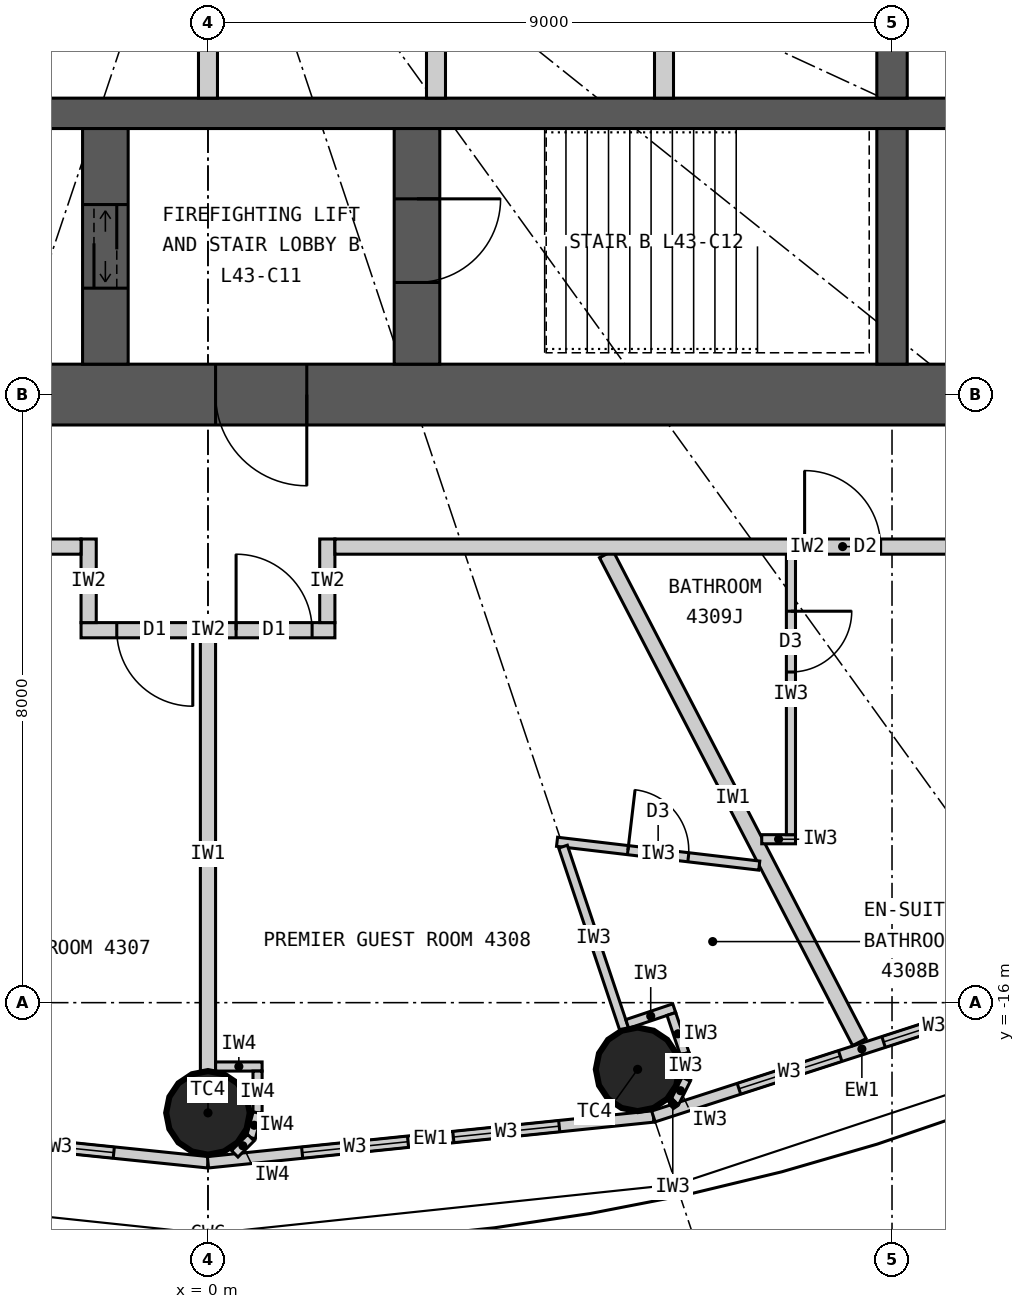
"""IFC4 building model, lengths in metres.
Left out: names, types, materials, properties, quantities, classifications, styles, units other than length and angle.
Written with IfcOpenShell. Run it as: python <this file> out.ifc"""

import sys

from ifc_helpers import new_model, si_unit, direction, frame, frame_2d, origin, origin_2d, place, context, subcontext, project, spatial, rectangle, circle, extrude, element, fill, save


model = new_model("IFC4")
c1 = context("Model", 3, precision=1e-05, world=origin(), true_north=direction((0.0, 1.0)))
c2 = subcontext(c1, "Body", "Model", "MODEL_VIEW")
j1 = project(units=[si_unit("LENGTHUNIT", "METRE"), si_unit("PLANEANGLEUNIT", "RADIAN")], contexts=[c1])
p1 = place(None, origin())
s1 = spatial("IfcSite", under=j1, at=p1, CompositionType="ELEMENT")
p2 = place(p1, origin())
s2 = spatial("IfcBuilding", under=s1, at=p2, CompositionType="ELEMENT")
p3 = place(p2, frame((0.0, 0.0, 163.2)))
s3 = spatial("IfcBuildingStorey", under=s2, at=p3, CompositionType="ELEMENT", Elevation=163.2)
for number, where, z_axis, x_axis in (
    (1, (0.0, -17.45, 0.0), (0.0, 0.0, 1.0), (1.0, 0.0, 0.0)),
    (2, (5.653, -16.877, 0.0), (0.0, 0.0, 1.0), (1.0, 0.0, 0.0)),
):
    element("IfcColumn", number, at=place(p3, frame(where, z_axis=z_axis, x_axis=x_axis)), inside=s3, PredefinedType="COLUMN", context=c2, shape_type="SweptSolid", body=[
        extrude(circle(Radius=0.55, at=origin_2d()), origin(), (0.0, 0.0, 1.0), 3.3),
    ])
p4 = place(p3, frame((12.4, -8.0, 0.0), z_axis=(0.0, 0.0, 1.0), x_axis=(-1.0, 0.0, 0.0)))
e3 = element("IfcWall", 3, at=p4, inside=s3, PredefinedType="SHEAR", context=c2, shape_type="SweptSolid", body=[
    extrude(rectangle(XDim=24.8, YDim=0.8, at=frame_2d((12.4, 0.0))), origin(), (0.0, 0.0, 1.0), 3.3),
])
p5 = place(p4, frame((11.1, 0.0, 0.0)))
e4 = element("IfcOpeningElement", 4, at=p5, cuts=e3, PredefinedType="OPENING", context=c2, shape_type="SweptSolid", body=[
    extrude(rectangle(XDim=1.2, YDim=2.2, at=frame_2d((0.6, 1.1))), frame((0.0, 0.41, 0.0), z_axis=(0.0, -1.0, 0.0), x_axis=(1.0, 0.0, 0.0)), (0.0, 0.0, 1.0), 0.82),
])
p6 = place(p4, frame((18.7, 0.0, 0.0)))
e5 = element("IfcOpeningElement", 5, at=p6, cuts=e3, PredefinedType="OPENING", context=c2, shape_type="SweptSolid", body=[
    extrude(rectangle(XDim=0.9, YDim=2.2, at=frame_2d((0.45, 1.1))), frame((0.0, 0.41, 0.0), z_axis=(0.0, -1.0, 0.0), x_axis=(1.0, 0.0, 0.0)), (0.0, 0.0, 1.0), 0.82),
])
p7 = place(p3, frame((-11.6, -4.3, 0.0), z_axis=(0.0, 0.0, 1.0), x_axis=(1.0, 0.0, 0.0)))
e6 = element("IfcWall", 6, at=p7, inside=s3, PredefinedType="SHEAR", context=c2, shape_type="SweptSolid", body=[
    extrude(rectangle(XDim=23.2, YDim=0.4, at=frame_2d((11.6, 0.0))), origin(), (0.0, 0.0, 1.0), 3.3),
])
p8 = place(p3, frame((9.0, -4.1, 0.0), z_axis=(0.0, 0.0, 1.0), x_axis=(0.0, 1.0, 0.0)))
e7 = element("IfcWall", 7, at=p8, inside=s3, PredefinedType="SHEAR", context=c2, shape_type="SweptSolid", body=[
    extrude(rectangle(XDim=2.35, YDim=0.4, at=frame_2d((1.175, 0.0))), origin(), (0.0, 0.0, 1.0), 3.3),
])
p9 = place(p3, frame((9.0, -7.6, 0.0), z_axis=(0.0, 0.0, 1.0), x_axis=(0.0, 1.0, 0.0)))
e8 = element("IfcWall", 8, at=p9, inside=s3, PredefinedType="SHEAR", context=c2, shape_type="SweptSolid", body=[
    extrude(rectangle(XDim=3.1, YDim=0.4, at=frame_2d((1.55, 0.0))), origin(), (0.0, 0.0, 1.0), 3.3),
])
p10 = place(p3, frame((2.75, -7.6, 0.0), z_axis=(0.0, 0.0, 1.0), x_axis=(0.0, 1.0, 0.0)))
e9 = element("IfcWall", 9, at=p10, inside=s3, PredefinedType="SHEAR", context=c2, shape_type="SweptSolid", body=[
    extrude(rectangle(XDim=3.1, YDim=0.6, at=frame_2d((1.55, 0.0))), origin(), (0.0, 0.0, 1.0), 3.3),
])
p11 = place(p10, frame((1.075, 0.0, 0.0)))
e10 = element("IfcOpeningElement", 10, at=p11, cuts=e9, PredefinedType="OPENING", context=c2, shape_type="SweptSolid", body=[
    extrude(rectangle(XDim=1.1, YDim=2.2, at=frame_2d((0.55, 1.1))), frame((0.0, 0.31, 0.0), z_axis=(0.0, -1.0, 0.0), x_axis=(1.0, 0.0, 0.0)), (0.0, 0.0, 1.0), 0.62),
])
p12 = place(p3, frame((-1.35, -7.6, 0.0), z_axis=(0.0, 0.0, 1.0), x_axis=(0.0, 1.0, 0.0)))
e11 = element("IfcWall", 11, at=p12, inside=s3, PredefinedType="SHEAR", context=c2, shape_type="SweptSolid", body=[
    extrude(rectangle(XDim=3.1, YDim=0.6, at=frame_2d((1.55, 0.0))), origin(), (0.0, 0.0, 1.0), 3.3),
])
p13 = place(p12, frame((1.0, 0.0, 0.0)))
e12 = element("IfcOpeningElement", 12, at=p13, cuts=e11, PredefinedType="OPENING", context=c2, shape_type="SweptSolid", body=[
    extrude(rectangle(XDim=1.1, YDim=2.2, at=frame_2d((0.55, 1.1))), frame((0.0, 0.31, 0.0), z_axis=(0.0, -1.0, 0.0), x_axis=(1.0, 0.0, 0.0)), (0.0, 0.0, 1.0), 0.62),
])
for number, where, z_axis, x_axis in (
    (13, (0.0, -4.1, 0.0), (0.0, 0.0, 1.0), (0.0, 1.0, 0.0)),
    (14, (3.0, -4.1, 0.0), (0.0, 0.0, 1.0), (0.0, 1.0, 0.0)),
    (15, (6.0, -4.1, 0.0), (0.0, 0.0, 1.0), (0.0, 1.0, 0.0)),
):
    element("IfcWall", number, at=place(p3, frame(where, z_axis=z_axis, x_axis=x_axis)), inside=s3, PredefinedType="PARTITIONING", context=c2, shape_type="SweptSolid", body=[
        extrude(rectangle(XDim=2.35, YDim=0.25, at=frame_2d((1.175, 0.0))), origin(), (0.0, 0.0, 1.0), 3.3),
    ])
p14 = place(p3, frame((-5.86, -17.497, 0.0), z_axis=(0.0, 0.0, 1.0), x_axis=(0.994751738032, -0.102318032045, 0.0)))
e16 = element("IfcWall", 16, at=p14, inside=s3, PredefinedType="ELEMENTEDWALL", context=c2, shape_type="SweptSolid", body=[
    extrude(rectangle(XDim=5.891, YDim=0.15, at=frame_2d((2.946, 0.0))), origin(), (0.0, 0.0, 1.0), 3.12),
])
p15 = place(p14, frame((1.246, 0.0, 0.9)))
e17 = element("IfcOpeningElement", 17, at=p15, cuts=e16, PredefinedType="OPENING", context=c2, shape_type="SweptSolid", body=[
    extrude(rectangle(XDim=1.4, YDim=1.9, at=frame_2d((0.7, 0.95))), frame((0.0, 0.085, 0.0), z_axis=(0.0, -1.0, 0.0), x_axis=(1.0, 0.0, 0.0)), (0.0, 0.0, 1.0), 0.17),
])
p16 = place(p14, frame((3.246, 0.0, 0.9)))
e18 = element("IfcOpeningElement", 18, at=p16, cuts=e16, PredefinedType="OPENING", context=c2, shape_type="SweptSolid", body=[
    extrude(rectangle(XDim=1.4, YDim=1.9, at=frame_2d((0.7, 0.95))), frame((0.0, 0.085, 0.0), z_axis=(0.0, -1.0, 0.0), x_axis=(1.0, 0.0, 0.0)), (0.0, 0.0, 1.0), 0.17),
])
p17 = place(p3, frame((0.0, -18.1, 0.0), z_axis=(0.0, 0.0, 1.0), x_axis=(0.994751738032, 0.102318032045, 0.0)))
e19 = element("IfcWall", 19, at=p17, inside=s3, PredefinedType="ELEMENTEDWALL", context=c2, shape_type="SweptSolid", body=[
    extrude(rectangle(XDim=5.891, YDim=0.15, at=frame_2d((2.946, 0.0))), origin(), (0.0, 0.0, 1.0), 3.12),
])
p18 = place(p17, frame((1.246, 0.0, 0.9)))
e20 = element("IfcOpeningElement", 20, at=p18, cuts=e19, PredefinedType="OPENING", context=c2, shape_type="SweptSolid", body=[
    extrude(rectangle(XDim=1.4, YDim=1.9, at=frame_2d((0.7, 0.95))), frame((0.0, 0.085, 0.0), z_axis=(0.0, -1.0, 0.0), x_axis=(1.0, 0.0, 0.0)), (0.0, 0.0, 1.0), 0.17),
])
p19 = place(p17, frame((3.246, 0.0, 0.9)))
e21 = element("IfcOpeningElement", 21, at=p19, cuts=e19, PredefinedType="OPENING", context=c2, shape_type="SweptSolid", body=[
    extrude(rectangle(XDim=1.4, YDim=1.9, at=frame_2d((0.7, 0.95))), frame((0.0, 0.085, 0.0), z_axis=(0.0, -1.0, 0.0), x_axis=(1.0, 0.0, 0.0)), (0.0, 0.0, 1.0), 0.17),
])
p20 = place(p3, frame((5.86, -17.497, 0.0), z_axis=(0.0, 0.0, 1.0), x_axis=(0.951432482129, 0.307857486429, 0.0)))
e22 = element("IfcWall", 22, at=p20, inside=s3, PredefinedType="ELEMENTEDWALL", context=c2, shape_type="SweptSolid", body=[
    extrude(rectangle(XDim=5.766, YDim=0.15, at=frame_2d((2.883, 0.0))), origin(), (0.0, 0.0, 1.0), 3.12),
])
p21 = place(p20, frame((1.183, 0.0, 0.9)))
e23 = element("IfcOpeningElement", 23, at=p21, cuts=e22, PredefinedType="OPENING", context=c2, shape_type="SweptSolid", body=[
    extrude(rectangle(XDim=1.4, YDim=1.9, at=frame_2d((0.7, 0.95))), frame((0.0, 0.085, 0.0), z_axis=(0.0, -1.0, 0.0), x_axis=(1.0, 0.0, 0.0)), (0.0, 0.0, 1.0), 0.17),
])
p22 = place(p20, frame((3.183, 0.0, 0.9)))
e24 = element("IfcOpeningElement", 24, at=p22, cuts=e22, PredefinedType="OPENING", context=c2, shape_type="SweptSolid", body=[
    extrude(rectangle(XDim=1.4, YDim=1.9, at=frame_2d((0.7, 0.95))), frame((0.0, 0.085, 0.0), z_axis=(0.0, -1.0, 0.0), x_axis=(1.0, 0.0, 0.0)), (0.0, 0.0, 1.0), 0.17),
])
p23 = place(p3, frame((0.0, -11.2, 0.0), z_axis=(0.0, 0.0, 1.0), x_axis=(0.0, -1.0, 0.0)))
e25 = element("IfcWall", 25, at=p23, inside=s3, PredefinedType="PARTITIONING", context=c2, shape_type="SweptSolid", body=[
    extrude(rectangle(XDim=5.7, YDim=0.2, at=frame_2d((2.85, 0.0))), origin(), (0.0, 0.0, 1.0), 2.42),
])
p24 = place(p3, frame((5.24, -10.1, 0.0), z_axis=(0.0, 0.0, 1.0), x_axis=(0.460532965373, -0.887642601391, 0.0)))
e26 = element("IfcWall", 26, at=p24, inside=s3, PredefinedType="PARTITIONING", context=c2, shape_type="SweptSolid", body=[
    extrude(rectangle(XDim=7.231, YDim=0.2, at=frame_2d((3.616, 0.0))), origin(), (0.0, 0.0, 1.0), 3.12),
])
p25 = place(p3, frame((1.67, -11.1, 0.0), z_axis=(0.0, 0.0, 1.0), x_axis=(-1.0, 0.0, 0.0)))
e27 = element("IfcWall", 27, at=p25, inside=s3, PredefinedType="PARTITIONING", context=c2, shape_type="SweptSolid", body=[
    extrude(rectangle(XDim=3.34, YDim=0.2, at=frame_2d((1.67, 0.0))), origin(), (0.0, 0.0, 1.0), 3.12),
])
p26 = place(p25, frame((1.87, 0.0, 0.0)))
e28 = element("IfcOpeningElement", 28, at=p26, cuts=e27, PredefinedType="OPENING", context=c2, shape_type="SweptSolid", body=[
    extrude(rectangle(XDim=1.0, YDim=2.2, at=frame_2d((0.5, 1.1))), frame((0.0, 0.11, 0.0), z_axis=(0.0, -1.0, 0.0), x_axis=(1.0, 0.0, 0.0)), (0.0, 0.0, 1.0), 0.22),
])
p27 = place(p25, frame((0.3, 0.0, 0.0)))
e29 = element("IfcOpeningElement", 29, at=p27, cuts=e27, PredefinedType="OPENING", context=c2, shape_type="SweptSolid", body=[
    extrude(rectangle(XDim=1.0, YDim=2.2, at=frame_2d((0.5, 1.1))), frame((0.0, 0.11, 0.0), z_axis=(0.0, -1.0, 0.0), x_axis=(1.0, 0.0, 0.0)), (0.0, 0.0, 1.0), 0.22),
])
for number, where, z_axis, x_axis in (
    (30, (1.57, -9.9, 0.0), (0.0, 0.0, 1.0), (0.0, -1.0, 0.0)),
    (31, (-1.57, -9.9, 0.0), (0.0, 0.0, 1.0), (0.0, -1.0, 0.0)),
):
    element("IfcWall", number, at=place(p3, frame(where, z_axis=z_axis, x_axis=x_axis)), inside=s3, PredefinedType="PARTITIONING", context=c2, shape_type="SweptSolid", body=[
        extrude(rectangle(XDim=1.1, YDim=0.2, at=frame_2d((0.55, 0.0))), origin(), (0.0, 0.0, 1.0), 3.12),
    ])
p28 = place(p3, frame((7.253, -14.197, 0.0), z_axis=(0.0, 0.0, 1.0), x_axis=(-0.993128188393, 0.117031625725, 0.0)))
e32 = element("IfcWall", 32, at=p28, inside=s3, PredefinedType="PARTITIONING", context=c2, shape_type="SweptSolid", body=[
    extrude(rectangle(XDim=2.678, YDim=0.12, at=frame_2d((1.339, 0.0))), origin(), (0.0, 0.0, 1.0), 3.12),
])
p29 = place(p28, frame((0.939, 0.0, 0.0)))
e33 = element("IfcOpeningElement", 33, at=p29, cuts=e32, PredefinedType="OPENING", context=c2, shape_type="SweptSolid", body=[
    extrude(rectangle(XDim=0.8, YDim=2.1, at=frame_2d((0.4, 1.05))), frame((0.0, 0.07, 0.0), z_axis=(0.0, -1.0, 0.0), x_axis=(1.0, 0.0, 0.0)), (0.0, 0.0, 1.0), 0.14),
])
p30 = place(p3, frame((4.671, -13.948, 0.0), z_axis=(0.0, 0.0, 1.0), x_axis=(0.317669167093, -0.948201613729, 0.0)))
e34 = element("IfcWall", 34, at=p30, inside=s3, PredefinedType="PARTITIONING", context=c2, shape_type="SweptSolid", body=[
    extrude(rectangle(XDim=2.54, YDim=0.12, at=frame_2d((1.27, 0.0))), origin(), (0.0, 0.0, 1.0), 2.42),
])
p31 = place(p3, frame((5.516, -16.28, 0.0), z_axis=(0.0, 0.0, 1.0), x_axis=(0.948157944392, 0.317799484717, 0.0)))
e35 = element("IfcWall", 35, at=p31, inside=s3, PredefinedType="PARTITIONING", context=c2, shape_type="SweptSolid", body=[
    extrude(rectangle(XDim=0.652, YDim=0.12, at=frame_2d((0.326, 0.0))), origin(), (0.0, 0.0, 1.0), 3.12),
])
p32 = place(p3, frame((6.097, -16.149, 0.0), z_axis=(0.0, 0.0, 1.0), x_axis=(0.317292604854, -0.948327687514, 0.0)))
e36 = element("IfcWall", 36, at=p32, inside=s3, PredefinedType="PARTITIONING", context=c2, shape_type="SweptSolid", body=[
    extrude(rectangle(XDim=0.55, YDim=0.12, at=frame_2d((0.275, 0.0))), origin(), (0.0, 0.0, 1.0), 3.12),
])
for number, where, z_axis, x_axis in (
    (37, (6.271, -16.67, 0.0), (0.0, 0.0, 1.0), (0.061, -0.998, 0.0)),
    (38, (6.292, -17.007, 0.0), (0.0, 0.0, 1.0), (-0.445, -0.895, 0.0)),
):
    element("IfcWall", number, at=place(p3, frame(where, z_axis=z_axis, x_axis=x_axis)), inside=s3, PredefinedType="PARTITIONING", context=c2, shape_type="SweptSolid", body=[
        extrude(rectangle(XDim=0.338, YDim=0.12, at=frame_2d((0.169, 0.0))), origin(), (0.0, 0.0, 1.0), 3.12),
    ])
p33 = place(p3, frame((6.142, -17.31, 0.0), z_axis=(0.0, 0.0, 1.0), x_axis=(-0.835039693181, -0.550189704386, 0.0)))
e39 = element("IfcWall", 39, at=p33, inside=s3, PredefinedType="PARTITIONING", context=c2, shape_type="SweptSolid", body=[
    extrude(rectangle(XDim=0.062, YDim=0.12, at=frame_2d((0.031, 0.0))), origin(), (0.0, 0.0, 1.0), 3.12),
])
p34 = place(p3, frame((7.286, -13.85, 0.0), z_axis=(0.0, 0.0, 1.0), x_axis=(1.0, 0.0, 0.0)))
e40 = element("IfcWall", 40, at=p34, inside=s3, PredefinedType="PARTITIONING", context=c2, shape_type="SweptSolid", body=[
    extrude(rectangle(XDim=0.444, YDim=0.12, at=frame_2d((0.222, 0.0))), origin(), (0.0, 0.0, 1.0), 3.12),
])
p35 = place(p3, frame((7.67, -10.1, 0.0), z_axis=(0.0, 0.0, 1.0), x_axis=(0.0, -1.0, 0.0)))
e41 = element("IfcWall", 41, at=p35, inside=s3, PredefinedType="PARTITIONING", context=c2, shape_type="SweptSolid", body=[
    extrude(rectangle(XDim=3.69, YDim=0.12, at=frame_2d((1.845, 0.0))), origin(), (0.0, 0.0, 1.0), 3.12),
])
p36 = place(p35, frame((0.75, 0.0, 0.0)))
e42 = element("IfcOpeningElement", 42, at=p36, cuts=e41, PredefinedType="OPENING", context=c2, shape_type="SweptSolid", body=[
    extrude(rectangle(XDim=0.8, YDim=2.1, at=frame_2d((0.4, 1.05))), frame((0.0, 0.07, 0.0), z_axis=(0.0, -1.0, 0.0), x_axis=(1.0, 0.0, 0.0)), (0.0, 0.0, 1.0), 0.14),
])
p37 = place(p3, frame((14.1, -10.0, 0.0), z_axis=(0.0, 0.0, 1.0), x_axis=(-1.0, 0.0, 0.0)))
e43 = element("IfcWall", 43, at=p37, inside=s3, PredefinedType="PARTITIONING", context=c2, shape_type="SweptSolid", body=[
    extrude(rectangle(XDim=12.43, YDim=0.2, at=frame_2d((6.215, 0.0))), origin(), (0.0, 0.0, 1.0), 3.12),
])
p38 = place(p37, frame((5.25, 0.0, 0.0)))
e44 = element("IfcOpeningElement", 44, at=p38, cuts=e43, PredefinedType="OPENING", context=c2, shape_type="SweptSolid", body=[
    extrude(rectangle(XDim=1.0, YDim=2.2, at=frame_2d((0.5, 1.1))), frame((0.0, 0.11, 0.0), z_axis=(0.0, -1.0, 0.0), x_axis=(1.0, 0.0, 0.0)), (0.0, 0.0, 1.0), 0.22),
])
p39 = place(p3, frame((-1.67, -10.0, 0.0), z_axis=(0.0, 0.0, 1.0), x_axis=(-1.0, 0.0, 0.0)))
e45 = element("IfcWall", 45, at=p39, inside=s3, PredefinedType="PARTITIONING", context=c2, shape_type="SweptSolid", body=[
    extrude(rectangle(XDim=12.43, YDim=0.2, at=frame_2d((6.215, 0.0))), origin(), (0.0, 0.0, 1.0), 3.12),
])
p40 = place(p39, frame((9.655, 0.0, 0.0)))
e46 = element("IfcOpeningElement", 46, at=p40, cuts=e45, PredefinedType="OPENING", context=c2, shape_type="SweptSolid", body=[
    extrude(rectangle(XDim=1.0, YDim=2.2, at=frame_2d((0.5, 1.1))), frame((0.0, 0.11, 0.0), z_axis=(0.0, -1.0, 0.0), x_axis=(1.0, 0.0, 0.0)), (0.0, 0.0, 1.0), 0.22),
])
p41 = place(p3, frame((0.1, -16.84, 0.0), z_axis=(0.0, 0.0, 1.0), x_axis=(1.0, 0.0, 0.0)))
e47 = element("IfcWall", 47, at=p41, inside=s3, PredefinedType="PARTITIONING", context=c2, shape_type="SweptSolid", body=[
    extrude(rectangle(XDim=0.612, YDim=0.12, at=frame_2d((0.306, 0.0))), origin(), (0.0, 0.0, 1.0), 3.12),
])
p42 = place(p3, frame((0.652, -16.9, 0.0), z_axis=(0.0, 0.0, 1.0), x_axis=(0.0, -1.0, 0.0)))
e48 = element("IfcWall", 48, at=p42, inside=s3, PredefinedType="PARTITIONING", context=c2, shape_type="SweptSolid", body=[
    extrude(rectangle(XDim=0.55, YDim=0.12, at=frame_2d((0.275, 0.0))), origin(), (0.0, 0.0, 1.0), 3.12),
])
p43 = place(p3, frame((0.652, -17.45, 0.0), z_axis=(0.0, 0.0, 1.0), x_axis=(-0.258832454679, -0.965922233104, 0.0)))
e49 = element("IfcWall", 49, at=p43, inside=s3, PredefinedType="PARTITIONING", context=c2, shape_type="SweptSolid", body=[
    extrude(rectangle(XDim=0.338, YDim=0.12, at=frame_2d((0.169, 0.0))), origin(), (0.0, 0.0, 1.0), 3.12),
])
p44 = place(p3, frame((0.565, -17.776, 0.0), z_axis=(0.0, 0.0, 1.0), x_axis=(-0.707106781187, -0.707106781187, 0.0)))
e50 = element("IfcWall", 50, at=p44, inside=s3, PredefinedType="PARTITIONING", context=c2, shape_type="SweptSolid", body=[
    extrude(rectangle(XDim=0.301, YDim=0.12, at=frame_2d((0.15, 0.0))), origin(), (0.0, 0.0, 1.0), 3.12),
])
p45 = place(p16, origin())
e51 = element("IfcWindow", 51, at=p45, inside=s3, PartitioningType="SINGLE_PANEL", PredefinedType="WINDOW", context=c2, shape_type="SweptSolid", body=[
    extrude(rectangle(XDim=1.4, YDim=1.9, at=frame_2d((0.7, 0.95))), frame((0.0, 0.03, 0.0), z_axis=(0.0, -1.0, 0.0), x_axis=(1.0, 0.0, 0.0)), (0.0, 0.0, 1.0), 0.06),
])
fill(e18, e51)
p46 = place(p18, origin())
e52 = element("IfcWindow", 52, at=p46, inside=s3, PartitioningType="SINGLE_PANEL", PredefinedType="WINDOW", context=c2, shape_type="SweptSolid", body=[
    extrude(rectangle(XDim=1.4, YDim=1.9, at=frame_2d((0.7, 0.95))), frame((0.0, 0.03, 0.0), z_axis=(0.0, -1.0, 0.0), x_axis=(1.0, 0.0, 0.0)), (0.0, 0.0, 1.0), 0.06),
])
fill(e20, e52)
p47 = place(p19, origin())
e53 = element("IfcWindow", 53, at=p47, inside=s3, PartitioningType="SINGLE_PANEL", PredefinedType="WINDOW", context=c2, shape_type="SweptSolid", body=[
    extrude(rectangle(XDim=1.4, YDim=1.9, at=frame_2d((0.7, 0.95))), frame((0.0, 0.03, 0.0), z_axis=(0.0, -1.0, 0.0), x_axis=(1.0, 0.0, 0.0)), (0.0, 0.0, 1.0), 0.06),
])
fill(e21, e53)
p48 = place(p21, origin())
e54 = element("IfcWindow", 54, at=p48, inside=s3, PartitioningType="SINGLE_PANEL", PredefinedType="WINDOW", context=c2, shape_type="SweptSolid", body=[
    extrude(rectangle(XDim=1.4, YDim=1.9, at=frame_2d((0.7, 0.95))), frame((0.0, 0.03, 0.0), z_axis=(0.0, -1.0, 0.0), x_axis=(1.0, 0.0, 0.0)), (0.0, 0.0, 1.0), 0.06),
])
fill(e23, e54)
p49 = place(p22, origin())
e55 = element("IfcWindow", 55, at=p49, inside=s3, PartitioningType="SINGLE_PANEL", PredefinedType="WINDOW", context=c2, shape_type="SweptSolid", body=[
    extrude(rectangle(XDim=1.4, YDim=1.9, at=frame_2d((0.7, 0.95))), frame((0.0, 0.03, 0.0), z_axis=(0.0, -1.0, 0.0), x_axis=(1.0, 0.0, 0.0)), (0.0, 0.0, 1.0), 0.06),
])
fill(e24, e55)
p50 = place(p26, origin())
e56 = element("IfcDoor", 56, at=p50, inside=s3, OperationType="SINGLE_SWING_LEFT", PredefinedType="DOOR", context=c2, shape_type="SweptSolid", body=[
    extrude(rectangle(XDim=1.0, YDim=2.2, at=frame_2d((0.5, 1.1))), frame((0.0, 0.025, 0.0), z_axis=(0.0, -1.0, 0.0), x_axis=(1.0, 0.0, 0.0)), (0.0, 0.0, 1.0), 0.05),
])
fill(e28, e56)
p51 = place(p29, origin())
e57 = element("IfcDoor", 57, at=p51, inside=s3, OperationType="SINGLE_SWING_RIGHT", PredefinedType="DOOR", context=c2, shape_type="SweptSolid", body=[
    extrude(rectangle(XDim=0.8, YDim=2.1, at=frame_2d((0.4, 1.05))), frame((0.0, 0.025, 0.0), z_axis=(0.0, -1.0, 0.0), x_axis=(1.0, 0.0, 0.0)), (0.0, 0.0, 1.0), 0.05),
])
fill(e33, e57)
p52 = place(p27, origin())
e58 = element("IfcDoor", 58, at=p52, inside=s3, OperationType="SINGLE_SWING_RIGHT", PredefinedType="DOOR", context=c2, shape_type="SweptSolid", body=[
    extrude(rectangle(XDim=1.0, YDim=2.2, at=frame_2d((0.5, 1.1))), frame((0.0, 0.025, 0.0), z_axis=(0.0, -1.0, 0.0), x_axis=(1.0, 0.0, 0.0)), (0.0, 0.0, 1.0), 0.05),
])
fill(e29, e58)
p53 = place(p36, origin())
e59 = element("IfcDoor", 59, at=p53, inside=s3, OperationType="SINGLE_SWING_LEFT", PredefinedType="DOOR", context=c2, shape_type="SweptSolid", body=[
    extrude(rectangle(XDim=0.8, YDim=2.1, at=frame_2d((0.4, 1.05))), frame((0.0, 0.025, 0.0), z_axis=(0.0, -1.0, 0.0), x_axis=(1.0, 0.0, 0.0)), (0.0, 0.0, 1.0), 0.05),
])
fill(e42, e59)
p54 = place(p38, origin())
e60 = element("IfcDoor", 60, at=p54, inside=s3, OperationType="SINGLE_SWING_RIGHT", PredefinedType="DOOR", context=c2, shape_type="SweptSolid", body=[
    extrude(rectangle(XDim=1.0, YDim=2.2, at=frame_2d((0.5, 1.1))), frame((0.0, 0.025, 0.0), z_axis=(0.0, -1.0, 0.0), x_axis=(1.0, 0.0, 0.0)), (0.0, 0.0, 1.0), 0.05),
])
fill(e44, e60)
p55 = place(p5, origin())
e61 = element("IfcDoor", 61, at=p55, inside=s3, OperationType="SINGLE_SWING_LEFT", PredefinedType="DOOR", context=c2, shape_type="SweptSolid", body=[
    extrude(rectangle(XDim=1.2, YDim=2.2, at=frame_2d((0.6, 1.1))), frame((0.0, 0.025, 0.0), z_axis=(0.0, -1.0, 0.0), x_axis=(1.0, 0.0, 0.0)), (0.0, 0.0, 1.0), 0.05),
])
fill(e4, e61)
p56 = place(p11, origin())
e62 = element("IfcDoor", 62, at=p56, inside=s3, OperationType="SINGLE_SWING_RIGHT", PredefinedType="DOOR", context=c2, shape_type="SweptSolid", body=[
    extrude(rectangle(XDim=1.1, YDim=2.2, at=frame_2d((0.55, 1.1))), frame((0.0, 0.025, 0.0), z_axis=(0.0, -1.0, 0.0), x_axis=(1.0, 0.0, 0.0)), (0.0, 0.0, 1.0), 0.05),
])
fill(e10, e62)
p57 = place(p13, origin())
e63 = element("IfcDoor", 63, at=p57, inside=s3, OperationType="DOUBLE_DOOR_SLIDING", PredefinedType="DOOR", context=c2, shape_type="SweptSolid", body=[
    extrude(rectangle(XDim=1.1, YDim=2.2, at=frame_2d((0.55, 1.1))), frame((0.0, 0.025, 0.0), z_axis=(0.0, -1.0, 0.0), x_axis=(1.0, 0.0, 0.0)), (0.0, 0.0, 1.0), 0.05),
])
fill(e12, e63)
save(model, sys.argv[1])
